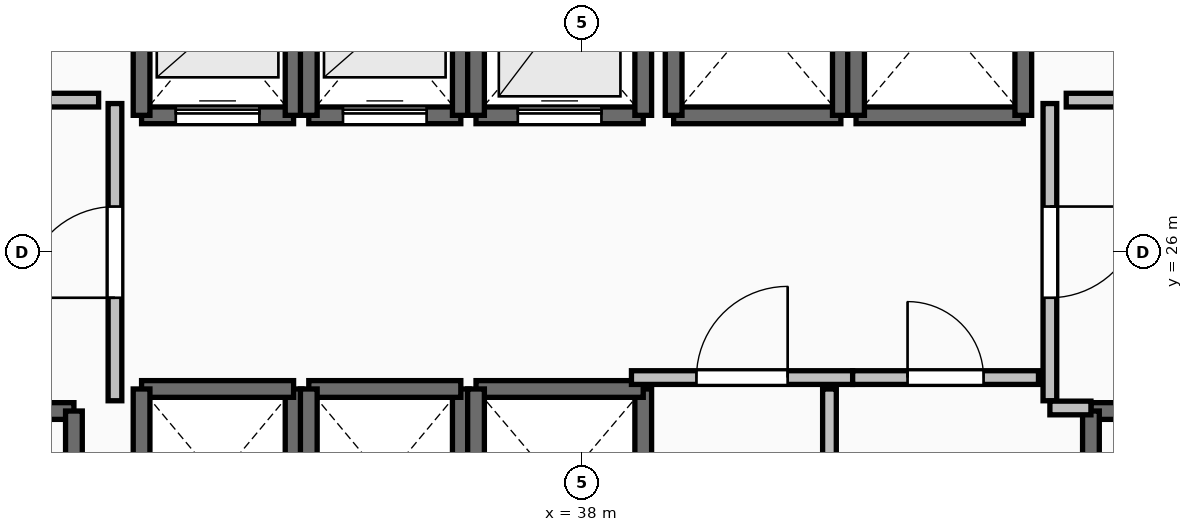
"""IFC4 building model, lengths in metres.
Left out: names, types, materials, properties, quantities, classifications, styles, units other than length and angle.
Written with IfcOpenShell. Run it as: python <this file> out.ifc"""

import sys

from ifc_helpers import new_model, si_unit, direction, frame, frame_2d, origin, place, context, subcontext, project, spatial, rectangle, extrude, element, fill, save


model = new_model("IFC4")
c1 = context("Model", 3, precision=1e-05, world=origin(), true_north=direction((0.0, 1.0)))
c2 = subcontext(c1, "Body", "Model", "MODEL_VIEW")
j1 = project(units=[si_unit("LENGTHUNIT", "METRE"), si_unit("PLANEANGLEUNIT", "RADIAN")], contexts=[c1])
p1 = place(None, origin())
s1 = spatial("IfcSite", under=j1, at=p1, CompositionType="ELEMENT")
p2 = place(p1, origin())
s2 = spatial("IfcBuilding", under=s1, at=p2, CompositionType="ELEMENT")
p3 = place(p2, frame((0.0, 0.0, 14.4)))
s3 = spatial("IfcBuildingStorey", under=s2, at=p3, CompositionType="ELEMENT", Elevation=14.4)
p4 = place(p3, frame((27.94, 23.91, 0.0), z_axis=(0.0, 0.0, 1.0), x_axis=(1.0, 0.0, 0.0)))
e1 = element("IfcWall", 1, at=p4, inside=s3, PredefinedType="SOLIDWALL", context=c2, shape_type="SweptSolid", body=[
    extrude(rectangle(XDim=3.37, YDim=0.22, at=frame_2d((1.685, 0.0))), origin(), (0.0, 0.0, 1.0), 4.48),
])
p5 = place(p4, frame((1.135, 0.0, 0.0)))
e2 = element("IfcOpeningElement", 2, at=p5, cuts=e1, PredefinedType="OPENING", context=c2, shape_type="SweptSolid", body=[
    extrude(rectangle(XDim=1.1, YDim=2.15, at=frame_2d((0.55, 1.075))), frame((0.0, 0.125, 0.0), z_axis=(0.0, -1.0, 0.0), x_axis=(1.0, 0.0, 0.0)), (0.0, 0.0, 1.0), 0.25),
])
p6 = place(p3, frame((31.31, 23.91, 0.0), z_axis=(0.0, 0.0, 1.0), x_axis=(0.0, -1.0, 0.0)))
e3 = element("IfcWall", 3, at=p6, inside=s3, PredefinedType="SOLIDWALL", context=c2, shape_type="SweptSolid", body=[
    extrude(rectangle(XDim=7.42, YDim=0.22, at=frame_2d((3.71, 0.0))), origin(), (0.0, 0.0, 1.0), 4.48),
])
p7 = place(p3, frame((44.69, 23.91, 0.0), z_axis=(0.0, 0.0, 1.0), x_axis=(1.0, 0.0, 0.0)))
e4 = element("IfcWall", 4, at=p7, inside=s3, PredefinedType="SOLIDWALL", context=c2, shape_type="SweptSolid", body=[
    extrude(rectangle(XDim=3.37, YDim=0.22, at=frame_2d((1.685, 0.0))), origin(), (0.0, 0.0, 1.0), 4.48),
])
p8 = place(p7, frame((1.135, 0.0, 0.0)))
e5 = element("IfcOpeningElement", 5, at=p8, cuts=e4, PredefinedType="OPENING", context=c2, shape_type="SweptSolid", body=[
    extrude(rectangle(XDim=1.1, YDim=2.15, at=frame_2d((0.55, 1.075))), frame((0.0, 0.125, 0.0), z_axis=(0.0, -1.0, 0.0), x_axis=(1.0, 0.0, 0.0)), (0.0, 0.0, 1.0), 0.25),
])
p9 = place(p3, frame((44.69, 16.49, 0.0), z_axis=(0.0, 0.0, 1.0), x_axis=(0.0, 1.0, 0.0)))
e6 = element("IfcWall", 6, at=p9, inside=s3, PredefinedType="SOLIDWALL", context=c2, shape_type="SweptSolid", body=[
    extrude(rectangle(XDim=7.42, YDim=0.22, at=frame_2d((3.71, 0.0))), origin(), (0.0, 0.0, 1.0), 4.48),
])
p10 = place(p3, frame((32.2, 27.8, 0.0), z_axis=(0.0, 0.0, 1.0), x_axis=(1.0, 0.0, 0.0)))
e7 = element("IfcWall", 7, at=p10, inside=s3, PredefinedType="SOLIDWALL", context=c2, shape_type="SweptSolid", body=[
    extrude(rectangle(XDim=2.0, YDim=0.22, at=frame_2d((1.0, 0.0))), origin(), (0.0, 0.0, 1.0), 4.48),
])
p11 = place(p10, frame((0.45, 0.0, 0.0)))
e8 = element("IfcOpeningElement", 8, at=p11, cuts=e7, PredefinedType="OPENING", context=c2, shape_type="SweptSolid", body=[
    extrude(rectangle(XDim=1.1, YDim=2.2, at=frame_2d((0.55, 1.1))), frame((0.0, 0.125, 0.0), z_axis=(0.0, -1.0, 0.0), x_axis=(1.0, 0.0, 0.0)), (0.0, 0.0, 1.0), 0.25),
])
for number, where, z_axis, x_axis in (
    (9, (34.2, 27.8, 0.0), (0.0, 0.0, 1.0), (0.0, 1.0, 0.0)),
    (10, (32.2, 30.2, 0.0), (0.0, 0.0, 1.0), (0.0, -1.0, 0.0)),
):
    element("IfcWall", number, at=place(p3, frame(where, z_axis=z_axis, x_axis=x_axis)), inside=s3, PredefinedType="SOLIDWALL", context=c2, shape_type="SweptSolid", body=[
        extrude(rectangle(XDim=2.4, YDim=0.22, at=frame_2d((1.2, 0.0))), origin(), (0.0, 0.0, 1.0), 4.48),
    ])
p12 = place(p3, frame((34.4, 27.8, 0.0), z_axis=(0.0, 0.0, 1.0), x_axis=(1.0, 0.0, 0.0)))
e11 = element("IfcWall", 11, at=p12, inside=s3, PredefinedType="SOLIDWALL", context=c2, shape_type="SweptSolid", body=[
    extrude(rectangle(XDim=2.0, YDim=0.22, at=frame_2d((1.0, 0.0))), origin(), (0.0, 0.0, 1.0), 4.48),
])
p13 = place(p12, frame((0.45, 0.0, 0.0)))
e12 = element("IfcOpeningElement", 12, at=p13, cuts=e11, PredefinedType="OPENING", context=c2, shape_type="SweptSolid", body=[
    extrude(rectangle(XDim=1.1, YDim=2.2, at=frame_2d((0.55, 1.1))), frame((0.0, 0.125, 0.0), z_axis=(0.0, -1.0, 0.0), x_axis=(1.0, 0.0, 0.0)), (0.0, 0.0, 1.0), 0.25),
])
for number, where, z_axis, x_axis in (
    (13, (36.4, 27.8, 0.0), (0.0, 0.0, 1.0), (0.0, 1.0, 0.0)),
    (14, (34.4, 30.2, 0.0), (0.0, 0.0, 1.0), (0.0, -1.0, 0.0)),
):
    element("IfcWall", number, at=place(p3, frame(where, z_axis=z_axis, x_axis=x_axis)), inside=s3, PredefinedType="SOLIDWALL", context=c2, shape_type="SweptSolid", body=[
        extrude(rectangle(XDim=2.4, YDim=0.22, at=frame_2d((1.2, 0.0))), origin(), (0.0, 0.0, 1.0), 4.48),
    ])
p14 = place(p3, frame((36.6, 27.8, 0.0), z_axis=(0.0, 0.0, 1.0), x_axis=(1.0, 0.0, 0.0)))
e15 = element("IfcWall", 15, at=p14, inside=s3, PredefinedType="SOLIDWALL", context=c2, shape_type="SweptSolid", body=[
    extrude(rectangle(XDim=2.2, YDim=0.22, at=frame_2d((1.1, 0.0))), origin(), (0.0, 0.0, 1.0), 4.48),
])
p15 = place(p14, frame((0.55, 0.0, 0.0)))
e16 = element("IfcOpeningElement", 16, at=p15, cuts=e15, PredefinedType="OPENING", context=c2, shape_type="SweptSolid", body=[
    extrude(rectangle(XDim=1.1, YDim=2.2, at=frame_2d((0.55, 1.1))), frame((0.0, 0.125, 0.0), z_axis=(0.0, -1.0, 0.0), x_axis=(1.0, 0.0, 0.0)), (0.0, 0.0, 1.0), 0.25),
])
for number, where, z_axis, x_axis in (
    (17, (38.8, 27.8, 0.0), (0.0, 0.0, 1.0), (0.0, 1.0, 0.0)),
    (18, (36.6, 30.4, 0.0), (0.0, 0.0, 1.0), (0.0, -1.0, 0.0)),
):
    element("IfcWall", number, at=place(p3, frame(where, z_axis=z_axis, x_axis=x_axis)), inside=s3, PredefinedType="SOLIDWALL", context=c2, shape_type="SweptSolid", body=[
        extrude(rectangle(XDim=2.6, YDim=0.22, at=frame_2d((1.3, 0.0))), origin(), (0.0, 0.0, 1.0), 4.48),
    ])
p16 = place(p3, frame((34.2, 21.8, 0.0), z_axis=(0.0, 0.0, 1.0), x_axis=(0.0, 1.0, 0.0)))
e19 = element("IfcWall", 19, at=p16, inside=s3, PredefinedType="SOLIDWALL", context=c2, shape_type="SweptSolid", body=[
    extrude(rectangle(XDim=2.4, YDim=0.22, at=frame_2d((1.2, 0.0))), origin(), (0.0, 0.0, 1.0), 4.48),
])
p17 = place(p3, frame((34.2, 24.2, 0.0), z_axis=(0.0, 0.0, 1.0), x_axis=(-1.0, 0.0, 0.0)))
e20 = element("IfcWall", 20, at=p17, inside=s3, PredefinedType="SOLIDWALL", context=c2, shape_type="SweptSolid", body=[
    extrude(rectangle(XDim=2.0, YDim=0.22, at=frame_2d((1.0, 0.0))), origin(), (0.0, 0.0, 1.0), 4.48),
])
for number, where, z_axis, x_axis in (
    (21, (32.2, 24.2, 0.0), (0.0, 0.0, 1.0), (0.0, -1.0, 0.0)),
    (22, (36.4, 21.8, 0.0), (0.0, 0.0, 1.0), (0.0, 1.0, 0.0)),
):
    element("IfcWall", number, at=place(p3, frame(where, z_axis=z_axis, x_axis=x_axis)), inside=s3, PredefinedType="SOLIDWALL", context=c2, shape_type="SweptSolid", body=[
        extrude(rectangle(XDim=2.4, YDim=0.22, at=frame_2d((1.2, 0.0))), origin(), (0.0, 0.0, 1.0), 4.48),
    ])
p18 = place(p3, frame((36.4, 24.2, 0.0), z_axis=(0.0, 0.0, 1.0), x_axis=(-1.0, 0.0, 0.0)))
e23 = element("IfcWall", 23, at=p18, inside=s3, PredefinedType="SOLIDWALL", context=c2, shape_type="SweptSolid", body=[
    extrude(rectangle(XDim=2.0, YDim=0.22, at=frame_2d((1.0, 0.0))), origin(), (0.0, 0.0, 1.0), 4.48),
])
p19 = place(p3, frame((34.4, 24.2, 0.0), z_axis=(0.0, 0.0, 1.0), x_axis=(0.0, -1.0, 0.0)))
e24 = element("IfcWall", 24, at=p19, inside=s3, PredefinedType="SOLIDWALL", context=c2, shape_type="SweptSolid", body=[
    extrude(rectangle(XDim=2.4, YDim=0.22, at=frame_2d((1.2, 0.0))), origin(), (0.0, 0.0, 1.0), 4.48),
])
p20 = place(p3, frame((38.8, 21.6, 0.0), z_axis=(0.0, 0.0, 1.0), x_axis=(0.0, 1.0, 0.0)))
e25 = element("IfcWall", 25, at=p20, inside=s3, PredefinedType="SOLIDWALL", context=c2, shape_type="SweptSolid", body=[
    extrude(rectangle(XDim=2.6, YDim=0.22, at=frame_2d((1.3, 0.0))), origin(), (0.0, 0.0, 1.0), 4.48),
])
p21 = place(p3, frame((38.8, 24.2, 0.0), z_axis=(0.0, 0.0, 1.0), x_axis=(-1.0, 0.0, 0.0)))
e26 = element("IfcWall", 26, at=p21, inside=s3, PredefinedType="SOLIDWALL", context=c2, shape_type="SweptSolid", body=[
    extrude(rectangle(XDim=2.2, YDim=0.22, at=frame_2d((1.1, 0.0))), origin(), (0.0, 0.0, 1.0), 4.48),
])
p22 = place(p3, frame((36.6, 24.2, 0.0), z_axis=(0.0, 0.0, 1.0), x_axis=(0.0, -1.0, 0.0)))
e27 = element("IfcWall", 27, at=p22, inside=s3, PredefinedType="SOLIDWALL", context=c2, shape_type="SweptSolid", body=[
    extrude(rectangle(XDim=2.6, YDim=0.22, at=frame_2d((1.3, 0.0))), origin(), (0.0, 0.0, 1.0), 4.48),
])
p23 = place(p3, frame((39.2, 27.8, 0.0), z_axis=(0.0, 0.0, 1.0), x_axis=(1.0, 0.0, 0.0)))
e28 = element("IfcWall", 28, at=p23, inside=s3, PredefinedType="SOLIDWALL", context=c2, shape_type="SweptSolid", body=[
    extrude(rectangle(XDim=2.2, YDim=0.22, at=frame_2d((1.1, 0.0))), origin(), (0.0, 0.0, 1.0), 4.48),
])
for number, where, z_axis, x_axis in (
    (29, (41.4, 27.8, 0.0), (0.0, 0.0, 1.0), (0.0, 1.0, 0.0)),
    (30, (39.2, 30.4, 0.0), (0.0, 0.0, 1.0), (0.0, -1.0, 0.0)),
):
    element("IfcWall", number, at=place(p3, frame(where, z_axis=z_axis, x_axis=x_axis)), inside=s3, PredefinedType="SOLIDWALL", context=c2, shape_type="SweptSolid", body=[
        extrude(rectangle(XDim=2.6, YDim=0.22, at=frame_2d((1.3, 0.0))), origin(), (0.0, 0.0, 1.0), 4.48),
    ])
p24 = place(p3, frame((41.6, 27.8, 0.0), z_axis=(0.0, 0.0, 1.0), x_axis=(1.0, 0.0, 0.0)))
e31 = element("IfcWall", 31, at=p24, inside=s3, PredefinedType="SOLIDWALL", context=c2, shape_type="SweptSolid", body=[
    extrude(rectangle(XDim=2.2, YDim=0.22, at=frame_2d((1.1, 0.0))), origin(), (0.0, 0.0, 1.0), 4.48),
])
for number, where, z_axis, x_axis in (
    (32, (43.8, 27.8, 0.0), (0.0, 0.0, 1.0), (0.0, 1.0, 0.0)),
    (33, (41.6, 30.4, 0.0), (0.0, 0.0, 1.0), (0.0, -1.0, 0.0)),
):
    element("IfcWall", number, at=place(p3, frame(where, z_axis=z_axis, x_axis=x_axis)), inside=s3, PredefinedType="SOLIDWALL", context=c2, shape_type="SweptSolid", body=[
        extrude(rectangle(XDim=2.6, YDim=0.22, at=frame_2d((1.3, 0.0))), origin(), (0.0, 0.0, 1.0), 4.48),
    ])
p25 = place(p3, frame((31.85, 24.045, 0.0), z_axis=(0.0, 0.0, 1.0), x_axis=(0.0, 1.0, 0.0)))
e34 = element("IfcWall", 34, at=p25, inside=s3, PredefinedType="PARTITIONING", context=c2, shape_type="SweptSolid", body=[
    extrude(rectangle(XDim=3.91, YDim=0.18, at=frame_2d((1.955, 0.0))), origin(), (0.0, 0.0, 1.0), 4.48),
])
p26 = place(p25, frame((1.355, 0.0, 0.0)))
e35 = element("IfcOpeningElement", 35, at=p26, cuts=e34, PredefinedType="OPENING", context=c2, shape_type="SweptSolid", body=[
    extrude(rectangle(XDim=1.2, YDim=2.15, at=frame_2d((0.6, 1.075))), frame((0.0, 0.105, 0.0), z_axis=(0.0, -1.0, 0.0), x_axis=(1.0, 0.0, 0.0)), (0.0, 0.0, 1.0), 0.21),
])
p27 = place(p3, frame((44.15, 27.955, 0.0), z_axis=(0.0, 0.0, 1.0), x_axis=(0.0, -1.0, 0.0)))
e36 = element("IfcWall", 36, at=p27, inside=s3, PredefinedType="PARTITIONING", context=c2, shape_type="SweptSolid", body=[
    extrude(rectangle(XDim=3.91, YDim=0.18, at=frame_2d((1.955, 0.0))), origin(), (0.0, 0.0, 1.0), 4.48),
])
p28 = place(p27, frame((1.355, 0.0, 0.0)))
e37 = element("IfcOpeningElement", 37, at=p28, cuts=e36, PredefinedType="OPENING", context=c2, shape_type="SweptSolid", body=[
    extrude(rectangle(XDim=1.2, YDim=2.15, at=frame_2d((0.6, 1.075))), frame((0.0, 0.105, 0.0), z_axis=(0.0, -1.0, 0.0), x_axis=(1.0, 0.0, 0.0)), (0.0, 0.0, 1.0), 0.21),
])
p29 = place(p3, frame((44.15, 23.95, 0.0), z_axis=(0.0, 0.0, 1.0), x_axis=(1.0, 0.0, 0.0)))
e38 = element("IfcWall", 38, at=p29, inside=s3, PredefinedType="PARTITIONING", context=c2, shape_type="SweptSolid", body=[
    extrude(rectangle(XDim=0.54, YDim=0.18, at=frame_2d((0.27, 0.0))), origin(), (0.0, 0.0, 1.0), 4.48),
])
p30 = place(p3, frame((38.645, 24.35, 0.0), z_axis=(0.0, 0.0, 1.0), x_axis=(1.0, 0.0, 0.0)))
e39 = element("IfcWall", 39, at=p30, inside=s3, PredefinedType="PARTITIONING", context=c2, shape_type="SweptSolid", body=[
    extrude(rectangle(XDim=2.91, YDim=0.18, at=frame_2d((1.455, 0.0))), origin(), (0.0, 0.0, 1.0), 4.48),
])
p31 = place(p30, frame((0.855, 0.0, 0.0)))
e40 = element("IfcOpeningElement", 40, at=p31, cuts=e39, PredefinedType="OPENING", context=c2, shape_type="SweptSolid", body=[
    extrude(rectangle(XDim=1.2, YDim=2.15, at=frame_2d((0.6, 1.075))), frame((0.0, 0.105, 0.0), z_axis=(0.0, -1.0, 0.0), x_axis=(1.0, 0.0, 0.0)), (0.0, 0.0, 1.0), 0.21),
])
p32 = place(p3, frame((41.555, 24.35, 0.0), z_axis=(0.0, 0.0, 1.0), x_axis=(1.0, 0.0, 0.0)))
e41 = element("IfcWall", 41, at=p32, inside=s3, PredefinedType="PARTITIONING", context=c2, shape_type="SweptSolid", body=[
    extrude(rectangle(XDim=2.445, YDim=0.18, at=frame_2d((1.223, 0.0))), origin(), (0.0, 0.0, 1.0), 4.48),
])
p33 = place(p32, frame((0.722, 0.0, 0.0)))
e42 = element("IfcOpeningElement", 42, at=p33, cuts=e41, PredefinedType="OPENING", context=c2, shape_type="SweptSolid", body=[
    extrude(rectangle(XDim=1.0, YDim=2.15, at=frame_2d((0.5, 1.075))), frame((0.0, 0.105, 0.0), z_axis=(0.0, -1.0, 0.0), x_axis=(1.0, 0.0, 0.0)), (0.0, 0.0, 1.0), 0.21),
])
p34 = place(p3, frame((41.25, 20.305, 0.0), z_axis=(0.0, 0.0, 1.0), x_axis=(0.0, 1.0, 0.0)))
e43 = element("IfcWall", 43, at=p34, inside=s3, PredefinedType="PARTITIONING", context=c2, shape_type="SweptSolid", body=[
    extrude(rectangle(XDim=3.895, YDim=0.18, at=frame_2d((1.948, 0.0))), origin(), (0.0, 0.0, 1.0), 4.48),
])
p35 = place(p34, frame((1.448, 0.0, 0.0)))
e44 = element("IfcOpeningElement", 44, at=p35, cuts=e43, PredefinedType="OPENING", context=c2, shape_type="SweptSolid", body=[
    extrude(rectangle(XDim=1.0, YDim=2.15, at=frame_2d((0.5, 1.075))), frame((0.0, 0.105, 0.0), z_axis=(0.0, -1.0, 0.0), x_axis=(1.0, 0.0, 0.0)), (0.0, 0.0, 1.0), 0.21),
])
for number, where, z_axis, x_axis in (
    (45, (31.635, 28.0, 0.0), (0.0, 0.0, 1.0), (-1.0, 0.0, 0.0)),
    (46, (45.28, 28.0, 0.0), (0.0, 0.0, 1.0), (-1.0, 0.0, 0.0)),
):
    element("IfcWall", number, at=place(p3, frame(where, z_axis=z_axis, x_axis=x_axis)), inside=s3, PredefinedType="PARTITIONING", context=c2, shape_type="SweptSolid", body=[
        extrude(rectangle(XDim=0.915, YDim=0.18, at=frame_2d((0.458, 0.0))), origin(), (0.0, 0.0, 1.0), 4.48),
    ])
p36 = place(p11, origin())
e47 = element("IfcDoor", 47, at=p36, inside=s3, OperationType="SLIDING_TO_LEFT", PredefinedType="DOOR", context=c2, shape_type="SweptSolid", body=[
    extrude(rectangle(XDim=1.1, YDim=2.2, at=frame_2d((0.55, 1.1))), frame((0.0, 0.025, 0.0), z_axis=(0.0, -1.0, 0.0), x_axis=(1.0, 0.0, 0.0)), (0.0, 0.0, 1.0), 0.05),
])
fill(e8, e47)
p37 = place(p13, origin())
e48 = element("IfcDoor", 48, at=p37, inside=s3, OperationType="SLIDING_TO_LEFT", PredefinedType="DOOR", context=c2, shape_type="SweptSolid", body=[
    extrude(rectangle(XDim=1.1, YDim=2.2, at=frame_2d((0.55, 1.1))), frame((0.0, 0.025, 0.0), z_axis=(0.0, -1.0, 0.0), x_axis=(1.0, 0.0, 0.0)), (0.0, 0.0, 1.0), 0.05),
])
fill(e12, e48)
p38 = place(p15, origin())
e49 = element("IfcDoor", 49, at=p38, inside=s3, OperationType="SLIDING_TO_LEFT", PredefinedType="DOOR", context=c2, shape_type="SweptSolid", body=[
    extrude(rectangle(XDim=1.1, YDim=2.2, at=frame_2d((0.55, 1.1))), frame((0.0, 0.025, 0.0), z_axis=(0.0, -1.0, 0.0), x_axis=(1.0, 0.0, 0.0)), (0.0, 0.0, 1.0), 0.05),
])
fill(e16, e49)
p39 = place(p26, origin())
e50 = element("IfcDoor", 50, at=p39, inside=s3, OperationType="SINGLE_SWING_LEFT", PredefinedType="DOOR", context=c2, shape_type="SweptSolid", body=[
    extrude(rectangle(XDim=1.2, YDim=2.15, at=frame_2d((0.6, 1.075))), frame((0.0, 0.025, 0.0), z_axis=(0.0, -1.0, 0.0), x_axis=(1.0, 0.0, 0.0)), (0.0, 0.0, 1.0), 0.05),
])
fill(e35, e50)
p40 = place(p28, origin())
e51 = element("IfcDoor", 51, at=p40, inside=s3, OperationType="SINGLE_SWING_LEFT", PredefinedType="DOOR", context=c2, shape_type="SweptSolid", body=[
    extrude(rectangle(XDim=1.2, YDim=2.15, at=frame_2d((0.6, 1.075))), frame((0.0, 0.025, 0.0), z_axis=(0.0, -1.0, 0.0), x_axis=(1.0, 0.0, 0.0)), (0.0, 0.0, 1.0), 0.05),
])
fill(e37, e51)
p41 = place(p31, origin())
e52 = element("IfcDoor", 52, at=p41, inside=s3, OperationType="SINGLE_SWING_RIGHT", PredefinedType="DOOR", context=c2, shape_type="SweptSolid", body=[
    extrude(rectangle(XDim=1.2, YDim=2.15, at=frame_2d((0.6, 1.075))), frame((0.0, 0.025, 0.0), z_axis=(0.0, -1.0, 0.0), x_axis=(1.0, 0.0, 0.0)), (0.0, 0.0, 1.0), 0.05),
])
fill(e40, e52)
p42 = place(p33, origin())
e53 = element("IfcDoor", 53, at=p42, inside=s3, OperationType="SINGLE_SWING_LEFT", PredefinedType="DOOR", context=c2, shape_type="SweptSolid", body=[
    extrude(rectangle(XDim=1.0, YDim=2.15, at=frame_2d((0.5, 1.075))), frame((0.0, 0.025, 0.0), z_axis=(0.0, -1.0, 0.0), x_axis=(1.0, 0.0, 0.0)), (0.0, 0.0, 1.0), 0.05),
])
fill(e42, e53)
save(model, sys.argv[1])
